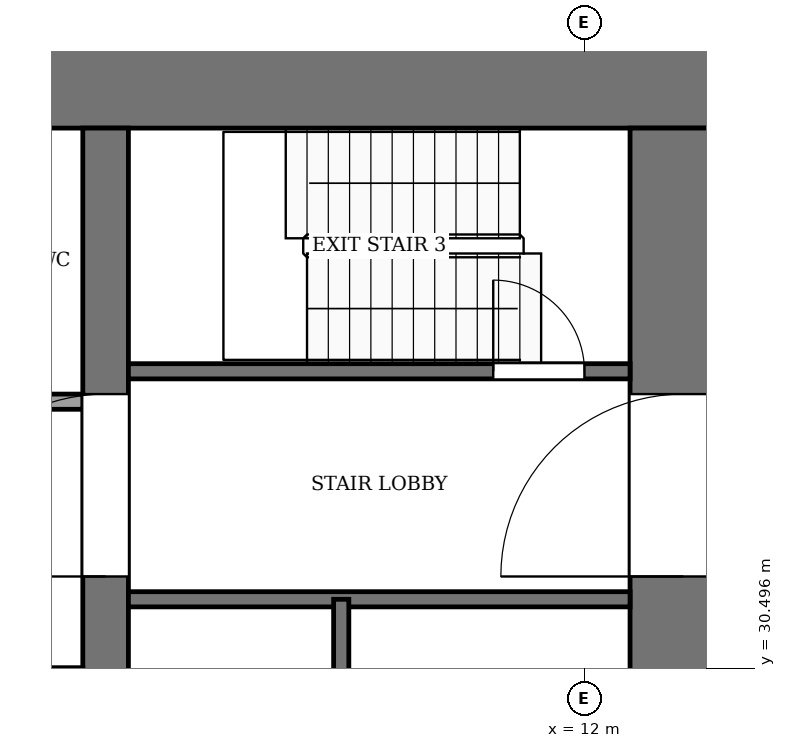
"""IFC4 building model, lengths in metres.
Left out: names, types, materials, properties, quantities, classifications, styles, units other than length and angle.
Written with IfcOpenShell. Run it as: python <this file> out.ifc"""

import sys

from ifc_helpers import new_model, si_unit, direction, frame, frame_2d, origin, place, context, subcontext, project, spatial, rectangle, extrude, element, fill, save


model = new_model("IFC4")
c1 = context("Model", 3, precision=1e-05, world=origin(), true_north=direction((0.0, 1.0)))
c2 = subcontext(c1, "Body", "Model", "MODEL_VIEW")
j1 = project(units=[si_unit("LENGTHUNIT", "METRE"), si_unit("PLANEANGLEUNIT", "RADIAN")], contexts=[c1])
p1 = place(None, origin())
s1 = spatial("IfcSite", under=j1, at=p1, CompositionType="ELEMENT")
p2 = place(p1, origin())
s2 = spatial("IfcBuilding", under=s1, at=p2, CompositionType="ELEMENT")
p3 = place(p2, frame((0.0, 0.0, 34.0)))
s3 = spatial("IfcBuildingStorey", under=s2, at=p3, CompositionType="ELEMENT", Elevation=34.0)
p4 = place(p3, frame((-14.0, 38.3, -0.13), z_axis=(0.0, 0.0, 1.0), x_axis=(1.0, 0.0, 0.0)))
e1 = element("IfcWall", 1, at=p4, inside=s3, PredefinedType="SHEAR", context=c2, shape_type="SweptSolid", body=[
    extrude(rectangle(XDim=28.0, YDim=1.4, at=frame_2d((14.0, 0.0))), origin(), (0.0, 0.0, 1.0), 4.0),
])
p5 = place(p3, frame((13.3, 18.4, -0.13), z_axis=(0.0, 0.0, 1.0), x_axis=(0.0, 1.0, 0.0)))
e2 = element("IfcWall", 2, at=p5, inside=s3, PredefinedType="SHEAR", context=c2, shape_type="SweptSolid", body=[
    extrude(rectangle(XDim=19.2, YDim=1.4, at=frame_2d((9.6, 0.0))), origin(), (0.0, 0.0, 1.0), 4.0),
])
p6 = place(p5, frame((2.8, 0.0, 0.13)))
e3 = element("IfcOpeningElement", 3, at=p6, cuts=e2, PredefinedType="OPENING", context=c2, shape_type="SweptSolid", body=[
    extrude(rectangle(XDim=2.4, YDim=2.4, at=frame_2d((1.2, 1.2))), frame((0.0, 0.71, 0.0), z_axis=(0.0, -1.0, 0.0), x_axis=(1.0, 0.0, 0.0)), (0.0, 0.0, 1.0), 1.42),
])
p7 = place(p5, frame((13.3, 0.0, 0.13)))
e4 = element("IfcOpeningElement", 4, at=p7, cuts=e2, PredefinedType="OPENING", context=c2, shape_type="SweptSolid", body=[
    extrude(rectangle(XDim=2.4, YDim=2.4, at=frame_2d((1.2, 1.2))), frame((0.0, 0.71, 0.0), z_axis=(0.0, -1.0, 0.0), x_axis=(1.0, 0.0, 0.0)), (0.0, 0.0, 1.0), 1.42),
])
p8 = place(p3, frame((5.7, 18.4, -0.13), z_axis=(0.0, 0.0, 1.0), x_axis=(0.0, 1.0, 0.0)))
e5 = element("IfcWall", 5, at=p8, inside=s3, PredefinedType="SHEAR", context=c2, shape_type="SweptSolid", body=[
    extrude(rectangle(XDim=19.2, YDim=0.6, at=frame_2d((9.6, 0.0))), origin(), (0.0, 0.0, 1.0), 4.0),
])
p9 = place(p8, frame((8.35, 0.0, 0.13)))
e6 = element("IfcOpeningElement", 6, at=p9, cuts=e5, PredefinedType="OPENING", context=c2, shape_type="SweptSolid", body=[
    extrude(rectangle(XDim=0.9, YDim=2.1, at=frame_2d((0.45, 1.05))), frame((0.0, 0.31, 0.0), z_axis=(0.0, -1.0, 0.0), x_axis=(1.0, 0.0, 0.0)), (0.0, 0.0, 1.0), 0.62),
])
p10 = place(p8, frame((13.3, 0.0, 0.13)))
e7 = element("IfcOpeningElement", 7, at=p10, cuts=e5, PredefinedType="OPENING", context=c2, shape_type="SweptSolid", body=[
    extrude(rectangle(XDim=2.4, YDim=2.4, at=frame_2d((1.2, 1.2))), frame((0.0, 0.31, 0.0), z_axis=(0.0, -1.0, 0.0), x_axis=(1.0, 0.0, 0.0)), (0.0, 0.0, 1.0), 0.62),
])
p11 = place(p3, frame((6.0, 31.4, 0.0), z_axis=(0.0, 0.0, 1.0), x_axis=(1.0, 0.0, 0.0)))
e8 = element("IfcWall", 8, at=p11, inside=s3, PredefinedType="PARTITIONING", context=c2, shape_type="SweptSolid", body=[
    extrude(rectangle(XDim=6.6, YDim=0.2, at=frame_2d((3.3, 0.0))), origin(), (0.0, 0.0, 1.0), 3.87),
])
p12 = place(p3, frame((-5.4, 34.0, 0.0), z_axis=(0.0, 0.0, 1.0), x_axis=(1.0, 0.0, 0.0)))
e9 = element("IfcWall", 9, at=p12, inside=s3, PredefinedType="PARTITIONING", context=c2, shape_type="SweptSolid", body=[
    extrude(rectangle(XDim=10.8, YDim=0.2, at=frame_2d((5.4, 0.0))), origin(), (0.0, 0.0, 1.0), 3.87),
])
p13 = place(p12, frame((6.15, 0.0, 0.0)))
e10 = element("IfcOpeningElement", 10, at=p13, cuts=e9, PredefinedType="OPENING", context=c2, shape_type="SweptSolid", body=[
    extrude(rectangle(XDim=1.2, YDim=2.2, at=frame_2d((0.6, 1.1))), frame((0.0, 0.11, 0.0), z_axis=(0.0, -1.0, 0.0), x_axis=(1.0, 0.0, 0.0)), (0.0, 0.0, 1.0), 0.22),
])
p14 = place(p12, frame((8.95, 0.0, 0.0)))
e11 = element("IfcOpeningElement", 11, at=p14, cuts=e9, PredefinedType="OPENING", context=c2, shape_type="SweptSolid", body=[
    extrude(rectangle(XDim=1.0, YDim=2.1, at=frame_2d((0.5, 1.05))), frame((0.0, 0.11, 0.0), z_axis=(0.0, -1.0, 0.0), x_axis=(1.0, 0.0, 0.0)), (0.0, 0.0, 1.0), 0.22),
])
p15 = place(p3, frame((6.0, 34.4, 0.0), z_axis=(0.0, 0.0, 1.0), x_axis=(1.0, 0.0, 0.0)))
e12 = element("IfcWall", 12, at=p15, inside=s3, PredefinedType="PARTITIONING", context=c2, shape_type="SweptSolid", body=[
    extrude(rectangle(XDim=6.6, YDim=0.2, at=frame_2d((3.3, 0.0))), origin(), (0.0, 0.0, 1.0), 3.87),
])
p16 = place(p15, frame((4.8, 0.0, 0.0)))
e13 = element("IfcOpeningElement", 13, at=p16, cuts=e12, PredefinedType="OPENING", context=c2, shape_type="SweptSolid", body=[
    extrude(rectangle(XDim=1.2, YDim=2.2, at=frame_2d((0.6, 1.1))), frame((0.0, 0.11, 0.0), z_axis=(0.0, -1.0, 0.0), x_axis=(1.0, 0.0, 0.0)), (0.0, 0.0, 1.0), 0.22),
])
p17 = place(p3, frame((8.8, 24.0, 0.0), z_axis=(0.0, 0.0, 1.0), x_axis=(0.0, 1.0, 0.0)))
e14 = element("IfcWall", 14, at=p17, inside=s3, PredefinedType="PARTITIONING", context=c2, shape_type="SweptSolid", body=[
    extrude(rectangle(XDim=7.4, YDim=0.2, at=frame_2d((3.7, 0.0))), origin(), (0.0, 0.0, 1.0), 3.87),
])
p18 = place(p16, origin())
e15 = element("IfcDoor", 15, at=p18, inside=s3, OperationType="SINGLE_SWING_RIGHT", PredefinedType="DOOR", context=c2, shape_type="SweptSolid", body=[
    extrude(rectangle(XDim=1.2, YDim=2.2, at=frame_2d((0.6, 1.1))), frame((0.0, 0.025, 0.0), z_axis=(0.0, -1.0, 0.0), x_axis=(1.0, 0.0, 0.0)), (0.0, 0.0, 1.0), 0.05),
])
fill(e13, e15)
p19 = place(p10, origin())
e16 = element("IfcDoor", 16, at=p19, inside=s3, OperationType="DOUBLE_DOOR_SINGLE_SWING", PredefinedType="DOOR", context=c2, shape_type="SweptSolid", body=[
    extrude(rectangle(XDim=2.4, YDim=2.4, at=frame_2d((1.2, 1.2))), frame((0.0, 0.025, 0.0), z_axis=(0.0, -1.0, 0.0), x_axis=(1.0, 0.0, 0.0)), (0.0, 0.0, 1.0), 0.05),
])
fill(e7, e16)
p20 = place(p7, origin())
e17 = element("IfcDoor", 17, at=p20, inside=s3, OperationType="DOUBLE_DOOR_SINGLE_SWING", PredefinedType="DOOR", context=c2, shape_type="SweptSolid", body=[
    extrude(rectangle(XDim=2.4, YDim=2.4, at=frame_2d((1.2, 1.2))), frame((0.0, 0.025, 0.0), z_axis=(0.0, -1.0, 0.0), x_axis=(1.0, 0.0, 0.0)), (0.0, 0.0, 1.0), 0.05),
])
fill(e4, e17)
save(model, sys.argv[1])
